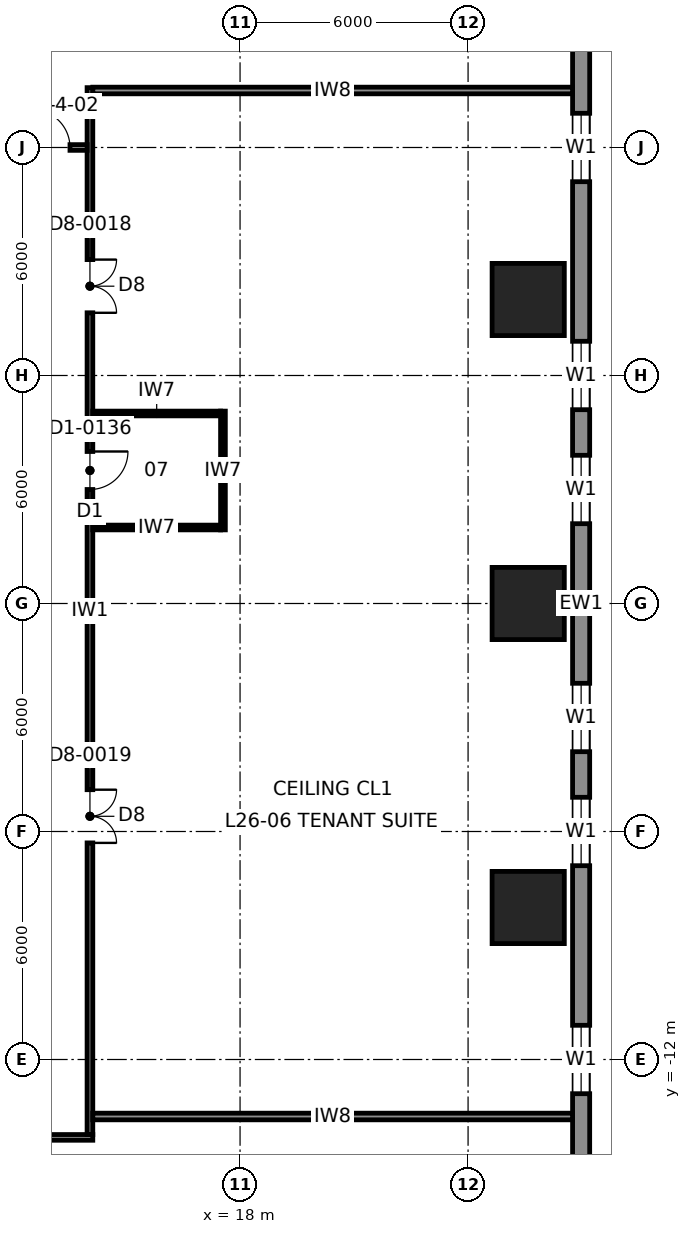
"""IFC4 building model, lengths in metres.
Left out: names, types, materials, properties, quantities, classifications, styles, units other than length and angle.
Written with IfcOpenShell. Run it as: python <this file> out.ifc"""

import sys

from ifc_helpers import new_model, si_unit, direction, frame, frame_2d, origin, origin_2d, place, context, subcontext, project, spatial, rectangle, extrude, element, fill, save


model = new_model("IFC4")
c1 = context("Model", 3, precision=1e-05, world=origin(), true_north=direction((0.0, 1.0)))
c2 = subcontext(c1, "Body", "Model", "MODEL_VIEW")
j1 = project(units=[si_unit("LENGTHUNIT", "METRE"), si_unit("PLANEANGLEUNIT", "RADIAN")], contexts=[c1])
p1 = place(None, origin())
s1 = spatial("IfcSite", under=j1, at=p1, CompositionType="ELEMENT")
p2 = place(p1, origin())
s2 = spatial("IfcBuilding", under=s1, at=p2, CompositionType="ELEMENT")
p3 = place(p2, frame((0.0, 0.0, 131.8)))
s3 = spatial("IfcBuildingStorey", under=s2, at=p3, CompositionType="ELEMENT", Elevation=131.8)
for number, where, z_axis, x_axis in (
    (1, (25.582, 0.0, 0.0), (-0.04, 0.0, 0.999), (0.0, -1.0, 0.0)),
    (2, (25.582, -8.0, 0.0), (-0.04, 0.0, 0.999), (0.0, -1.0, 0.0)),
    (3, (25.582, 8.0, 0.0), (-0.04, 0.0, 0.999), (0.0, -1.0, 0.0)),
):
    element("IfcColumn", number, at=place(p3, frame(where, z_axis=z_axis, x_axis=x_axis)), inside=s3, PredefinedType="COLUMN", context=c2, shape_type="SweptSolid", body=[
        extrude(rectangle(XDim=1.9, YDim=1.9, at=origin_2d()), origin(), (0.0, 0.0, 1.0), 4.003),
    ])
p4 = place(p3, frame((26.975, -22.7, 0.0), z_axis=(0.0, 0.0, 1.0), x_axis=(0.0, 1.0, 0.0)))
e4 = element("IfcWall", 4, at=p4, inside=s3, PredefinedType="SOLIDWALL", context=c2, shape_type="SweptSolid", body=[
    extrude(rectangle(XDim=45.4, YDim=0.45, at=frame_2d((22.7, 0.0))), origin(), (0.0, 0.0, 1.0), 3.83),
])
p5 = place(p4, frame((3.8, 0.0, 0.7)))
e5 = element("IfcOpeningElement", 5, at=p5, cuts=e4, PredefinedType="OPENING", context=c2, shape_type="SweptSolid", body=[
    extrude(rectangle(XDim=1.8, YDim=2.6, at=frame_2d((0.9, 1.3))), frame((0.0, 0.235, 0.0), z_axis=(0.0, -1.0, 0.0), x_axis=(1.0, 0.0, 0.0)), (0.0, 0.0, 1.0), 0.47),
])
p6 = place(p4, frame((9.8, 0.0, 0.7)))
e6 = element("IfcOpeningElement", 6, at=p6, cuts=e4, PredefinedType="OPENING", context=c2, shape_type="SweptSolid", body=[
    extrude(rectangle(XDim=1.8, YDim=2.6, at=frame_2d((0.9, 1.3))), frame((0.0, 0.235, 0.0), z_axis=(0.0, -1.0, 0.0), x_axis=(1.0, 0.0, 0.0)), (0.0, 0.0, 1.0), 0.47),
])
p7 = place(p4, frame((15.8, 0.0, 0.7)))
e7 = element("IfcOpeningElement", 7, at=p7, cuts=e4, PredefinedType="OPENING", context=c2, shape_type="SweptSolid", body=[
    extrude(rectangle(XDim=1.8, YDim=2.6, at=frame_2d((0.9, 1.3))), frame((0.0, 0.235, 0.0), z_axis=(0.0, -1.0, 0.0), x_axis=(1.0, 0.0, 0.0)), (0.0, 0.0, 1.0), 0.47),
])
p8 = place(p4, frame((18.8, 0.0, 0.7)))
e8 = element("IfcOpeningElement", 8, at=p8, cuts=e4, PredefinedType="OPENING", context=c2, shape_type="SweptSolid", body=[
    extrude(rectangle(XDim=1.8, YDim=2.6, at=frame_2d((0.9, 1.3))), frame((0.0, 0.235, 0.0), z_axis=(0.0, -1.0, 0.0), x_axis=(1.0, 0.0, 0.0)), (0.0, 0.0, 1.0), 0.47),
])
p9 = place(p4, frame((24.8, 0.0, 0.7)))
e9 = element("IfcOpeningElement", 9, at=p9, cuts=e4, PredefinedType="OPENING", context=c2, shape_type="SweptSolid", body=[
    extrude(rectangle(XDim=1.8, YDim=2.6, at=frame_2d((0.9, 1.3))), frame((0.0, 0.235, 0.0), z_axis=(0.0, -1.0, 0.0), x_axis=(1.0, 0.0, 0.0)), (0.0, 0.0, 1.0), 0.47),
])
p10 = place(p4, frame((27.8, 0.0, 0.7)))
e10 = element("IfcOpeningElement", 10, at=p10, cuts=e4, PredefinedType="OPENING", context=c2, shape_type="SweptSolid", body=[
    extrude(rectangle(XDim=1.8, YDim=2.6, at=frame_2d((0.9, 1.3))), frame((0.0, 0.235, 0.0), z_axis=(0.0, -1.0, 0.0), x_axis=(1.0, 0.0, 0.0)), (0.0, 0.0, 1.0), 0.47),
])
p11 = place(p4, frame((33.8, 0.0, 0.7)))
e11 = element("IfcOpeningElement", 11, at=p11, cuts=e4, PredefinedType="OPENING", context=c2, shape_type="SweptSolid", body=[
    extrude(rectangle(XDim=1.8, YDim=2.6, at=frame_2d((0.9, 1.3))), frame((0.0, 0.235, 0.0), z_axis=(0.0, -1.0, 0.0), x_axis=(1.0, 0.0, 0.0)), (0.0, 0.0, 1.0), 0.47),
])
p12 = place(p4, frame((39.8, 0.0, 0.7)))
e12 = element("IfcOpeningElement", 12, at=p12, cuts=e4, PredefinedType="OPENING", context=c2, shape_type="SweptSolid", body=[
    extrude(rectangle(XDim=1.8, YDim=2.6, at=frame_2d((0.9, 1.3))), frame((0.0, 0.235, 0.0), z_axis=(0.0, -1.0, 0.0), x_axis=(1.0, 0.0, 0.0)), (0.0, 0.0, 1.0), 0.47),
])
p13 = place(p3, frame((14.125, -14.05, 0.0), z_axis=(0.0, 0.0, 1.0), x_axis=(-1.0, 0.0, 0.0)))
e13 = element("IfcWall", 13, at=p13, inside=s3, PredefinedType="PARTITIONING", context=c2, shape_type="SweptSolid", body=[
    extrude(rectangle(XDim=28.25, YDim=0.15, at=frame_2d((14.125, 0.0))), origin(), (0.0, 0.0, 1.0), 3.83),
])
p14 = place(p13, frame((24.325, 0.0, 0.0)))
e14 = element("IfcOpeningElement", 14, at=p14, cuts=e13, PredefinedType="OPENING", context=c2, shape_type="SweptSolid", body=[
    extrude(rectangle(XDim=1.4, YDim=2.3, at=frame_2d((0.7, 1.15))), frame((0.0, 0.085, 0.0), z_axis=(0.0, -1.0, 0.0), x_axis=(1.0, 0.0, 0.0)), (0.0, 0.0, 1.0), 0.17),
])
p15 = place(p13, frame((13.425, 0.0, 0.0)))
e15 = element("IfcOpeningElement", 15, at=p15, cuts=e13, PredefinedType="OPENING", context=c2, shape_type="SweptSolid", body=[
    extrude(rectangle(XDim=1.4, YDim=2.3, at=frame_2d((0.7, 1.15))), frame((0.0, 0.085, 0.0), z_axis=(0.0, -1.0, 0.0), x_axis=(1.0, 0.0, 0.0)), (0.0, 0.0, 1.0), 0.17),
])
p16 = place(p13, frame((2.525, 0.0, 0.0)))
e16 = element("IfcOpeningElement", 16, at=p16, cuts=e13, PredefinedType="OPENING", context=c2, shape_type="SweptSolid", body=[
    extrude(rectangle(XDim=1.4, YDim=2.3, at=frame_2d((0.7, 1.15))), frame((0.0, 0.085, 0.0), z_axis=(0.0, -1.0, 0.0), x_axis=(1.0, 0.0, 0.0)), (0.0, 0.0, 1.0), 0.17),
])
p17 = place(p3, frame((14.05, -13.975, 0.0), z_axis=(0.0, 0.0, 1.0), x_axis=(0.0, 1.0, 0.0)))
e17 = element("IfcWall", 17, at=p17, inside=s3, PredefinedType="PARTITIONING", context=c2, shape_type="SweptSolid", body=[
    extrude(rectangle(XDim=27.55, YDim=0.15, at=frame_2d((13.775, 0.0))), origin(), (0.0, 0.0, 1.0), 3.83),
])
p18 = place(p17, frame((7.675, 0.0, 0.0)))
e18 = element("IfcOpeningElement", 18, at=p18, cuts=e17, PredefinedType="OPENING", context=c2, shape_type="SweptSolid", body=[
    extrude(rectangle(XDim=1.4, YDim=2.3, at=frame_2d((0.7, 1.15))), frame((0.0, 0.085, 0.0), z_axis=(0.0, -1.0, 0.0), x_axis=(1.0, 0.0, 0.0)), (0.0, 0.0, 1.0), 0.17),
])
p19 = place(p17, frame((21.625, 0.0, 0.0)))
e19 = element("IfcOpeningElement", 19, at=p19, cuts=e17, PredefinedType="OPENING", context=c2, shape_type="SweptSolid", body=[
    extrude(rectangle(XDim=1.4, YDim=2.3, at=frame_2d((0.7, 1.15))), frame((0.0, 0.085, 0.0), z_axis=(0.0, -1.0, 0.0), x_axis=(1.0, 0.0, 0.0)), (0.0, 0.0, 1.0), 0.17),
])
p20 = place(p17, frame((16.975, 0.0, 0.0)))
e20 = element("IfcOpeningElement", 20, at=p20, cuts=e17, PredefinedType="OPENING", context=c2, shape_type="SweptSolid", body=[
    extrude(rectangle(XDim=1.0, YDim=2.3, at=frame_2d((0.5, 1.15))), frame((0.0, 0.085, 0.0), z_axis=(0.0, -1.0, 0.0), x_axis=(1.0, 0.0, 0.0)), (0.0, 0.0, 1.0), 0.17),
])
p21 = place(p3, frame((12.0, 12.0, 0.0), z_axis=(0.0, 0.0, 1.0), x_axis=(1.0, 0.0, 0.0)))
e21 = element("IfcWall", 21, at=p21, inside=s3, PredefinedType="PARTITIONING", context=c2, shape_type="SweptSolid", body=[
    extrude(rectangle(XDim=1.975, YDim=0.15, at=frame_2d((0.988, 0.0))), origin(), (0.0, 0.0, 1.0), 3.83),
])
p22 = place(p21, frame((0.525, 0.0, 0.0)))
e22 = element("IfcOpeningElement", 22, at=p22, cuts=e21, PredefinedType="OPENING", context=c2, shape_type="SweptSolid", body=[
    extrude(rectangle(XDim=1.0, YDim=2.3, at=frame_2d((0.5, 1.15))), frame((0.0, 0.085, 0.0), z_axis=(0.0, -1.0, 0.0), x_axis=(1.0, 0.0, 0.0)), (0.0, 0.0, 1.0), 0.17),
])
for number, where, z_axis, x_axis in (
    (23, (14.125, 13.5, 0.0), (0.0, 0.0, 1.0), (1.0, 0.0, 0.0)),
    (24, (26.75, -13.5, 0.0), (0.0, 0.0, 1.0), (-1.0, 0.0, 0.0)),
):
    element("IfcWall", number, at=place(p3, frame(where, z_axis=z_axis, x_axis=x_axis)), inside=s3, PredefinedType="PARTITIONING", context=c2, shape_type="SweptSolid", body=[
        extrude(rectangle(XDim=12.625, YDim=0.175, at=frame_2d((6.312, 0.0))), origin(), (0.0, 0.0, 1.0), 3.83),
    ])
p23 = place(p3, frame((17.55, 1.938, 0.0), z_axis=(0.0, 0.0, 1.0), x_axis=(0.0, 1.0, 0.0)))
e25 = element("IfcWall", 25, at=p23, inside=s3, PredefinedType="PARTITIONING", context=c2, shape_type="SweptSolid", body=[
    extrude(rectangle(XDim=3.125, YDim=0.125, at=frame_2d((1.562, 0.0))), origin(), (0.0, 0.0, 1.0), 3.83),
])
for number, where, z_axis, x_axis in (
    (26, (14.125, 2.0, 0.0), (0.0, 0.0, 1.0), (1.0, 0.0, 0.0)),
    (27, (14.125, 5.0, 0.0), (0.0, 0.0, 1.0), (1.0, 0.0, 0.0)),
):
    element("IfcWall", number, at=place(p3, frame(where, z_axis=z_axis, x_axis=x_axis)), inside=s3, PredefinedType="PARTITIONING", context=c2, shape_type="SweptSolid", body=[
        extrude(rectangle(XDim=3.363, YDim=0.125, at=frame_2d((1.681, 0.0))), origin(), (0.0, 0.0, 1.0), 3.83),
    ])
p24 = place(p6, origin())
e28 = element("IfcWindow", 28, at=p24, inside=s3, PartitioningType="SINGLE_PANEL", PredefinedType="WINDOW", context=c2, shape_type="SweptSolid", body=[
    extrude(rectangle(XDim=1.8, YDim=2.6, at=frame_2d((0.9, 1.3))), frame((0.0, 0.03, 0.0), z_axis=(0.0, -1.0, 0.0), x_axis=(1.0, 0.0, 0.0)), (0.0, 0.0, 1.0), 0.06),
])
fill(e6, e28)
p25 = place(p7, origin())
e29 = element("IfcWindow", 29, at=p25, inside=s3, PartitioningType="SINGLE_PANEL", PredefinedType="WINDOW", context=c2, shape_type="SweptSolid", body=[
    extrude(rectangle(XDim=1.8, YDim=2.6, at=frame_2d((0.9, 1.3))), frame((0.0, 0.03, 0.0), z_axis=(0.0, -1.0, 0.0), x_axis=(1.0, 0.0, 0.0)), (0.0, 0.0, 1.0), 0.06),
])
fill(e7, e29)
p26 = place(p8, origin())
e30 = element("IfcWindow", 30, at=p26, inside=s3, PartitioningType="SINGLE_PANEL", PredefinedType="WINDOW", context=c2, shape_type="SweptSolid", body=[
    extrude(rectangle(XDim=1.8, YDim=2.6, at=frame_2d((0.9, 1.3))), frame((0.0, 0.03, 0.0), z_axis=(0.0, -1.0, 0.0), x_axis=(1.0, 0.0, 0.0)), (0.0, 0.0, 1.0), 0.06),
])
fill(e8, e30)
p27 = place(p9, origin())
e31 = element("IfcWindow", 31, at=p27, inside=s3, PartitioningType="SINGLE_PANEL", PredefinedType="WINDOW", context=c2, shape_type="SweptSolid", body=[
    extrude(rectangle(XDim=1.8, YDim=2.6, at=frame_2d((0.9, 1.3))), frame((0.0, 0.03, 0.0), z_axis=(0.0, -1.0, 0.0), x_axis=(1.0, 0.0, 0.0)), (0.0, 0.0, 1.0), 0.06),
])
fill(e9, e31)
p28 = place(p10, origin())
e32 = element("IfcWindow", 32, at=p28, inside=s3, PartitioningType="SINGLE_PANEL", PredefinedType="WINDOW", context=c2, shape_type="SweptSolid", body=[
    extrude(rectangle(XDim=1.8, YDim=2.6, at=frame_2d((0.9, 1.3))), frame((0.0, 0.03, 0.0), z_axis=(0.0, -1.0, 0.0), x_axis=(1.0, 0.0, 0.0)), (0.0, 0.0, 1.0), 0.06),
])
fill(e10, e32)
p29 = place(p11, origin())
e33 = element("IfcWindow", 33, at=p29, inside=s3, PartitioningType="SINGLE_PANEL", PredefinedType="WINDOW", context=c2, shape_type="SweptSolid", body=[
    extrude(rectangle(XDim=1.8, YDim=2.6, at=frame_2d((0.9, 1.3))), frame((0.0, 0.03, 0.0), z_axis=(0.0, -1.0, 0.0), x_axis=(1.0, 0.0, 0.0)), (0.0, 0.0, 1.0), 0.06),
])
fill(e11, e33)
p30 = place(p22, origin())
e34 = element("IfcDoor", 34, at=p30, inside=s3, OperationType="SINGLE_SWING_LEFT", PredefinedType="DOOR", context=c2, shape_type="SweptSolid", body=[
    extrude(rectangle(XDim=1.0, YDim=2.3, at=frame_2d((0.5, 1.15))), frame((0.0, 0.025, 0.0), z_axis=(0.0, -1.0, 0.0), x_axis=(1.0, 0.0, 0.0)), (0.0, 0.0, 1.0), 0.05),
])
fill(e22, e34)
p31 = place(p18, frame((1.4, 0.0, 0.0), z_axis=(0.0, 0.0, 1.0), x_axis=(-1.0, 0.0, 0.0)))
e35 = element("IfcDoor", 35, at=p31, inside=s3, OperationType="DOUBLE_DOOR_SINGLE_SWING", PredefinedType="DOOR", context=c2, shape_type="SweptSolid", body=[
    extrude(rectangle(XDim=1.4, YDim=2.3, at=frame_2d((0.7, 1.15))), frame((0.0, 0.025, 0.0), z_axis=(0.0, -1.0, 0.0), x_axis=(1.0, 0.0, 0.0)), (0.0, 0.0, 1.0), 0.05),
])
fill(e18, e35)
p32 = place(p19, frame((1.4, 0.0, 0.0), z_axis=(0.0, 0.0, 1.0), x_axis=(-1.0, 0.0, 0.0)))
e36 = element("IfcDoor", 36, at=p32, inside=s3, OperationType="DOUBLE_DOOR_SINGLE_SWING", PredefinedType="DOOR", context=c2, shape_type="SweptSolid", body=[
    extrude(rectangle(XDim=1.4, YDim=2.3, at=frame_2d((0.7, 1.15))), frame((0.0, 0.025, 0.0), z_axis=(0.0, -1.0, 0.0), x_axis=(1.0, 0.0, 0.0)), (0.0, 0.0, 1.0), 0.05),
])
fill(e19, e36)
p33 = place(p20, frame((1.0, 0.0, 0.0), z_axis=(0.0, 0.0, 1.0), x_axis=(-1.0, 0.0, 0.0)))
e37 = element("IfcDoor", 37, at=p33, inside=s3, OperationType="SINGLE_SWING_LEFT", PredefinedType="DOOR", context=c2, shape_type="SweptSolid", body=[
    extrude(rectangle(XDim=1.0, YDim=2.3, at=frame_2d((0.5, 1.15))), frame((0.0, 0.025, 0.0), z_axis=(0.0, -1.0, 0.0), x_axis=(1.0, 0.0, 0.0)), (0.0, 0.0, 1.0), 0.05),
])
fill(e20, e37)
save(model, sys.argv[1])
